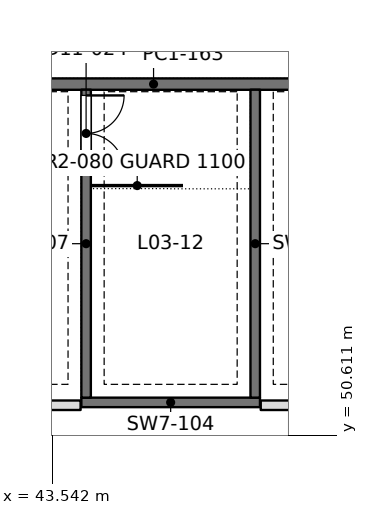
"""IFC4 building model, lengths in metres.
Left out: names, types, materials, properties, quantities, classifications, styles, units other than length and angle.
Written with IfcOpenShell. Run it as: python <this file> out.ifc"""

import sys

from ifc_helpers import new_model, si_unit, direction, frame, frame_2d, origin, place, context, subcontext, project, spatial, rectangle, extrude, element, fill, save


model = new_model("IFC4")
c1 = context("Model", 3, precision=1e-05, world=origin(), true_north=direction((0.0, 1.0)))
c2 = subcontext(c1, "Body", "Model", "MODEL_VIEW")
j1 = project(units=[si_unit("LENGTHUNIT", "METRE"), si_unit("PLANEANGLEUNIT", "RADIAN")], contexts=[c1])
p1 = place(None, origin())
s1 = spatial("IfcSite", under=j1, at=p1, CompositionType="ELEMENT")
p2 = place(p1, origin())
s2 = spatial("IfcBuilding", under=s1, at=p2, CompositionType="ELEMENT")
p3 = place(p2, frame((0.0, 0.0, 14.4)))
s3 = spatial("IfcBuildingStorey", under=s2, at=p3, CompositionType="ELEMENT", Elevation=14.4)
p4 = place(p3, frame((42.0, 59.85, 0.0), z_axis=(0.0, 0.0, 1.0), x_axis=(1.0, 0.0, 0.0)))
e1 = element("IfcWall", 1, at=p4, inside=s3, PredefinedType="SOLIDWALL", context=c2, shape_type="SweptSolid", body=[
    extrude(rectangle(XDim=8.4, YDim=0.3, at=frame_2d((4.2, 0.0))), origin(), (0.0, 0.0, 1.0), 4.25),
])
p5 = place(p3, frame((6.12, 51.4, 0.0), z_axis=(0.0, 0.0, 1.0), x_axis=(1.0, 0.0, 0.0)))
e2 = element("IfcWall", 2, at=p5, inside=s3, PredefinedType="PARTITIONING", context=c2, shape_type="SweptSolid", body=[
    extrude(rectangle(XDim=38.16, YDim=0.25, at=frame_2d((19.08, 0.0))), origin(), (0.0, 0.0, 1.0), 3.45),
])
p6 = place(p5, frame((13.88, 0.0, 0.0)))
e3 = element("IfcOpeningElement", 3, at=p6, cuts=e2, PredefinedType="OPENING", context=c2, shape_type="SweptSolid", body=[
    extrude(rectangle(XDim=2.0, YDim=2.4, at=frame_2d((1.0, 1.2))), frame((0.0, 0.135, 0.0), z_axis=(0.0, -1.0, 0.0), x_axis=(1.0, 0.0, 0.0)), (0.0, 0.0, 1.0), 0.27),
])
p7 = place(p5, frame((22.28, 0.0, 0.0)))
e4 = element("IfcOpeningElement", 4, at=p7, cuts=e2, PredefinedType="OPENING", context=c2, shape_type="SweptSolid", body=[
    extrude(rectangle(XDim=2.0, YDim=2.4, at=frame_2d((1.0, 1.2))), frame((0.0, 0.135, 0.0), z_axis=(0.0, -1.0, 0.0), x_axis=(1.0, 0.0, 0.0)), (0.0, 0.0, 1.0), 0.27),
])
p8 = place(p3, frame((49.02, 51.4, 0.0), z_axis=(0.0, 0.0, 1.0), x_axis=(1.0, 0.0, 0.0)))
e5 = element("IfcWall", 5, at=p8, inside=s3, PredefinedType="PARTITIONING", context=c2, shape_type="SweptSolid", body=[
    extrude(rectangle(XDim=2.38, YDim=0.25, at=frame_2d((1.19, 0.0))), origin(), (0.0, 0.0, 1.0), 3.6),
])
p9 = place(p3, frame((44.425, 59.702, 0.0), z_axis=(0.0, 0.0, 1.0), x_axis=(0.0, -1.0, 0.0)))
e6 = element("IfcWall", 6, at=p9, inside=s3, PredefinedType="SOLIDWALL", context=c2, shape_type="SweptSolid", body=[
    extrude(rectangle(XDim=8.102, YDim=0.25, at=frame_2d((4.051, 0.0))), origin(), (0.0, 0.0, 1.0), 4.5),
])
p10 = place(p9, frame((0.15, 0.0, 0.0)))
e7 = element("IfcOpeningElement", 7, at=p10, cuts=e6, PredefinedType="OPENING", context=c2, shape_type="SweptSolid", body=[
    extrude(rectangle(XDim=2.0, YDim=2.2, at=frame_2d((1.0, 1.1))), frame((0.0, 0.135, 0.0), z_axis=(0.0, -1.0, 0.0), x_axis=(1.0, 0.0, 0.0)), (0.0, 0.0, 1.0), 0.27),
])
p11 = place(p3, frame((48.875, 59.702, 0.0), z_axis=(0.0, 0.0, 1.0), x_axis=(0.0, -1.0, 0.0)))
e8 = element("IfcWall", 8, at=p11, inside=s3, PredefinedType="SOLIDWALL", context=c2, shape_type="SweptSolid", body=[
    extrude(rectangle(XDim=8.102, YDim=0.25, at=frame_2d((4.051, 0.0))), origin(), (0.0, 0.0, 1.0), 4.5),
])
p12 = place(p3, frame((44.3, 51.475, 0.0), z_axis=(0.0, 0.0, 1.0), x_axis=(1.0, 0.0, 0.0)))
e9 = element("IfcWall", 9, at=p12, inside=s3, PredefinedType="SOLIDWALL", context=c2, shape_type="SweptSolid", body=[
    extrude(rectangle(XDim=4.7, YDim=0.25, at=frame_2d((2.35, 0.0))), origin(), (0.0, 0.0, 1.0), 4.5),
])
p13 = place(p10, origin())
e10 = element("IfcDoor", 10, at=p13, inside=s3, OperationType="DOUBLE_DOOR_SINGLE_SWING", PredefinedType="DOOR", context=c2, shape_type="SweptSolid", body=[
    extrude(rectangle(XDim=2.0, YDim=2.2, at=frame_2d((1.0, 1.1))), frame((0.0, 0.025, 0.0), z_axis=(0.0, -1.0, 0.0), x_axis=(1.0, 0.0, 0.0)), (0.0, 0.0, 1.0), 0.05),
])
fill(e7, e10)
save(model, sys.argv[1])
